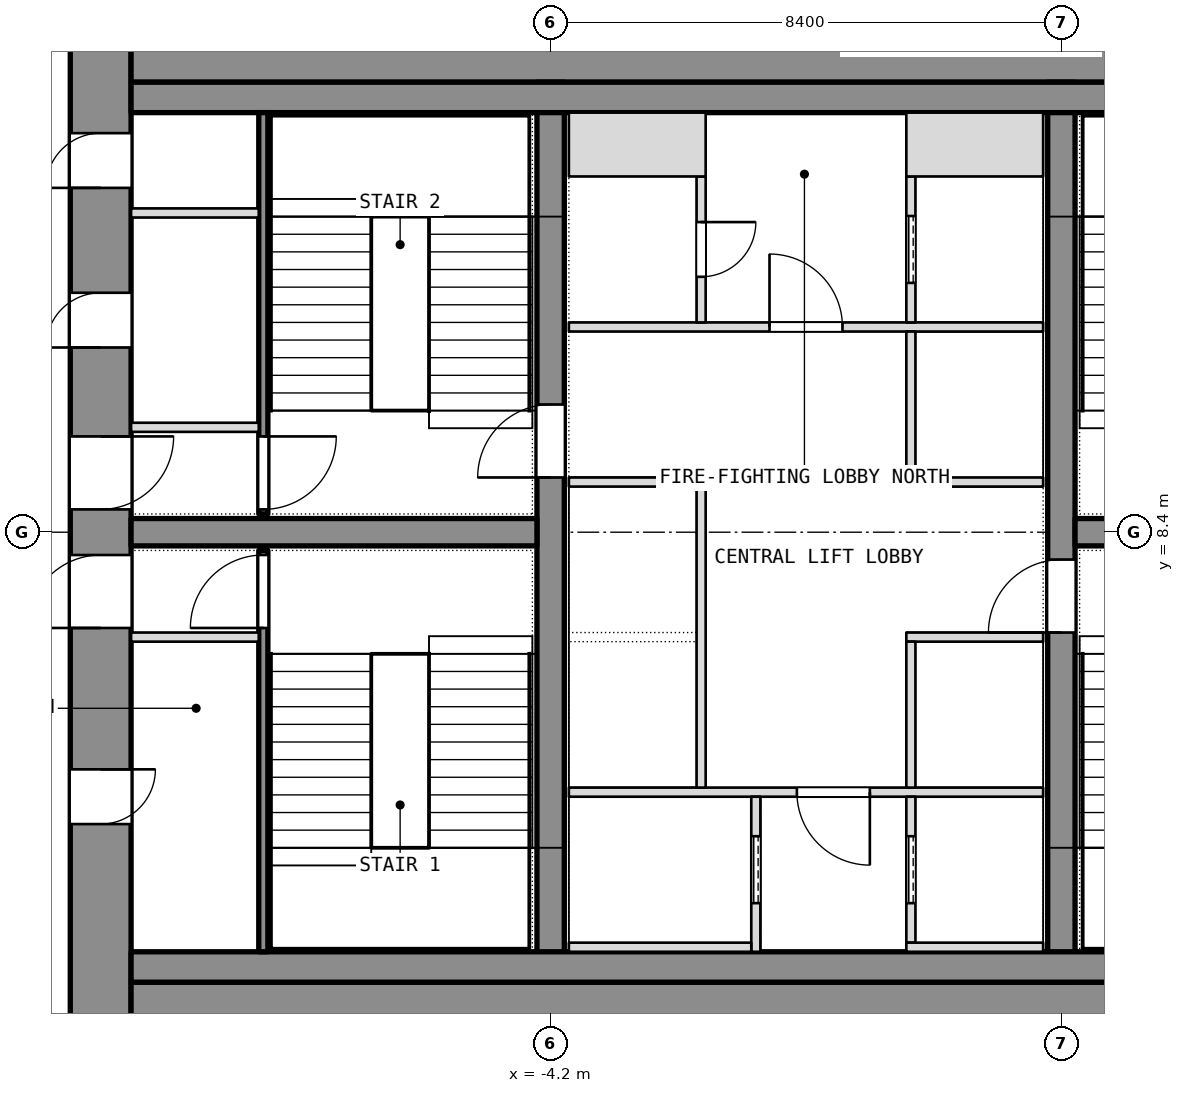
"""IFC4 building model, lengths in metres.
Left out: names, types, materials, properties, quantities, classifications, styles, units other than length and angle.
Written with IfcOpenShell. Run it as: python <this file> out.ifc"""

import sys

from ifc_helpers import new_model, si_unit, direction, frame, frame_2d, origin, place, context, subcontext, project, spatial, rectangle, extrude, element, fill, save


model = new_model("IFC4")
c1 = context("Model", 3, precision=1e-05, world=origin(), true_north=direction((0.0, 1.0)))
c2 = subcontext(c1, "Body", "Model", "MODEL_VIEW")
j1 = project(units=[si_unit("LENGTHUNIT", "METRE"), si_unit("PLANEANGLEUNIT", "RADIAN")], contexts=[c1])
p1 = place(None, origin())
s1 = spatial("IfcSite", under=j1, at=p1, CompositionType="ELEMENT")
p2 = place(p1, origin())
s2 = spatial("IfcBuilding", under=s1, at=p2, CompositionType="ELEMENT")
p3 = place(p2, frame((0.0, 0.0, 104.9)))
s3 = spatial("IfcBuildingStorey", under=s2, at=p3, CompositionType="ELEMENT", Elevation=104.9)
p4 = place(p3, frame((-11.6, 0.0, 0.0), z_axis=(0.0, 0.0, 1.0), x_axis=(0.0, 1.0, 0.0)))
e1 = element("IfcWall", 1, at=p4, inside=s3, PredefinedType="SHEAR", context=c2, shape_type="SweptSolid", body=[
    extrude(rectangle(XDim=16.8, YDim=1.0, at=frame_2d((8.4, 0.0))), origin(), (0.0, 0.0, 1.0), 3.6),
])
p5 = place(p4, frame((3.6, 0.0, 0.0)))
e2 = element("IfcOpeningElement", 2, at=p5, cuts=e1, PredefinedType="OPENING", context=c2, shape_type="SweptSolid", body=[
    extrude(rectangle(XDim=0.9, YDim=2.1, at=frame_2d((0.45, 1.05))), frame((0.0, 0.5, 0.0), z_axis=(0.0, -1.0, 0.0), x_axis=(1.0, 0.0, 0.0)), (0.0, 0.0, 1.0), 1.0),
])
p6 = place(p4, frame((6.825, 0.0, 0.0)))
e3 = element("IfcOpeningElement", 3, at=p6, cuts=e1, PredefinedType="OPENING", context=c2, shape_type="SweptSolid", body=[
    extrude(rectangle(XDim=1.2, YDim=2.1, at=frame_2d((0.6, 1.05))), frame((0.0, 0.5, 0.0), z_axis=(0.0, -1.0, 0.0), x_axis=(1.0, 0.0, 0.0)), (0.0, 0.0, 1.0), 1.0),
])
p7 = place(p4, frame((14.062, 0.0, 0.0)))
e4 = element("IfcOpeningElement", 4, at=p7, cuts=e1, PredefinedType="OPENING", context=c2, shape_type="SweptSolid", body=[
    extrude(rectangle(XDim=0.9, YDim=2.1, at=frame_2d((0.45, 1.05))), frame((0.0, 0.5, 0.0), z_axis=(0.0, -1.0, 0.0), x_axis=(1.0, 0.0, 0.0)), (0.0, 0.0, 1.0), 1.0),
])
p8 = place(p4, frame((11.438, 0.0, 0.0)))
e5 = element("IfcOpeningElement", 5, at=p8, cuts=e1, PredefinedType="OPENING", context=c2, shape_type="SweptSolid", body=[
    extrude(rectangle(XDim=0.9, YDim=2.1, at=frame_2d((0.45, 1.05))), frame((0.0, 0.5, 0.0), z_axis=(0.0, -1.0, 0.0), x_axis=(1.0, 0.0, 0.0)), (0.0, 0.0, 1.0), 1.0),
])
p9 = place(p4, frame((8.775, 0.0, 0.0)))
e6 = element("IfcOpeningElement", 6, at=p9, cuts=e1, PredefinedType="OPENING", context=c2, shape_type="SweptSolid", body=[
    extrude(rectangle(XDim=1.2, YDim=2.1, at=frame_2d((0.6, 1.05))), frame((0.0, 0.5, 0.0), z_axis=(0.0, -1.0, 0.0), x_axis=(1.0, 0.0, 0.0)), (0.0, 0.0, 1.0), 1.0),
])
for number, where, z_axis, x_axis in (
    (7, (-11.1, 0.5, 0.0), (0.0, 0.0, 1.0), (1.0, 0.0, 0.0)),
    (8, (-11.1, 16.3, 0.0), (0.0, 0.0, 1.0), (1.0, 0.0, 0.0)),
):
    element("IfcWall", number, at=place(p3, frame(where, z_axis=z_axis, x_axis=x_axis)), inside=s3, PredefinedType="SHEAR", context=c2, shape_type="SweptSolid", body=[
        extrude(rectangle(XDim=22.2, YDim=1.0, at=frame_2d((11.1, 0.0))), origin(), (0.0, 0.0, 1.0), 3.6),
    ])
p10 = place(p3, frame((-4.2, 1.0, 0.0), z_axis=(0.0, 0.0, 1.0), x_axis=(0.0, 1.0, 0.0)))
e9 = element("IfcWall", 9, at=p10, inside=s3, PredefinedType="SHEAR", context=c2, shape_type="SweptSolid", body=[
    extrude(rectangle(XDim=14.8, YDim=0.45, at=frame_2d((7.4, 0.0))), origin(), (0.0, 0.0, 1.0), 3.6),
])
p11 = place(p10, frame((8.3, 0.0, 0.0)))
e10 = element("IfcOpeningElement", 10, at=p11, cuts=e9, PredefinedType="OPENING", context=c2, shape_type="SweptSolid", body=[
    extrude(rectangle(XDim=1.2, YDim=2.1, at=frame_2d((0.6, 1.05))), frame((0.0, 0.225, 0.0), z_axis=(0.0, -1.0, 0.0), x_axis=(1.0, 0.0, 0.0)), (0.0, 0.0, 1.0), 0.45),
])
p12 = place(p3, frame((4.2, 1.0, 0.0), z_axis=(0.0, 0.0, 1.0), x_axis=(0.0, 1.0, 0.0)))
e11 = element("IfcWall", 11, at=p12, inside=s3, PredefinedType="SHEAR", context=c2, shape_type="SweptSolid", body=[
    extrude(rectangle(XDim=14.8, YDim=0.45, at=frame_2d((7.4, 0.0))), origin(), (0.0, 0.0, 1.0), 3.6),
])
p13 = place(p12, frame((5.75, 0.0, 0.0)))
e12 = element("IfcOpeningElement", 12, at=p13, cuts=e11, PredefinedType="OPENING", context=c2, shape_type="SweptSolid", body=[
    extrude(rectangle(XDim=1.2, YDim=2.1, at=frame_2d((0.6, 1.05))), frame((0.0, 0.225, 0.0), z_axis=(0.0, -1.0, 0.0), x_axis=(1.0, 0.0, 0.0)), (0.0, 0.0, 1.0), 0.45),
])
for number, where, z_axis, x_axis in (
    (13, (-11.1, 8.4, 0.0), (0.0, 0.0, 1.0), (1.0, 0.0, 0.0)),
    (14, (4.425, 8.4, 0.0), (0.0, 0.0, 1.0), (1.0, 0.0, 0.0)),
):
    element("IfcWall", number, at=place(p3, frame(where, z_axis=z_axis, x_axis=x_axis)), inside=s3, PredefinedType="SHEAR", context=c2, shape_type="SweptSolid", body=[
        extrude(rectangle(XDim=6.675, YDim=0.45, at=frame_2d((3.337, 0.0))), origin(), (0.0, 0.0, 1.0), 3.6),
    ])
for number, where, z_axis, x_axis in (
    (15, (-11.1, 1.25, 0.0), (0.0, 0.0, 1.0), (1.0, 0.0, 0.0)),
    (16, (-11.1, 15.55, 0.0), (0.0, 0.0, 1.0), (1.0, 0.0, 0.0)),
):
    element("IfcWall", number, at=place(p3, frame(where, z_axis=z_axis, x_axis=x_axis)), inside=s3, PredefinedType="PARTITIONING", context=c2, shape_type="SweptSolid", body=[
        extrude(rectangle(XDim=22.2, YDim=0.5, at=frame_2d((11.1, 0.0))), origin(), (0.0, 0.0, 1.0), 3.34),
    ])
p14 = place(p3, frame((-8.925, 1.5, 0.0), z_axis=(0.0, 0.0, 1.0), x_axis=(0.0, 1.0, 0.0)))
e17 = element("IfcWall", 17, at=p14, inside=s3, PredefinedType="SHEAR", context=c2, shape_type="SweptSolid", body=[
    extrude(rectangle(XDim=6.6, YDim=0.15, at=frame_2d((3.3, 0.0))), origin(), (0.0, 0.0, 1.0), 3.34),
])
p15 = place(p14, frame((5.325, 0.0, 0.0)))
e18 = element("IfcOpeningElement", 18, at=p15, cuts=e17, PredefinedType="OPENING", context=c2, shape_type="SweptSolid", body=[
    extrude(rectangle(XDim=1.2, YDim=2.1, at=frame_2d((0.6, 1.05))), frame((0.0, 0.075, 0.0), z_axis=(0.0, -1.0, 0.0), x_axis=(1.0, 0.0, 0.0)), (0.0, 0.0, 1.0), 0.15),
])
p16 = place(p3, frame((-11.1, 6.675, 0.0), z_axis=(0.0, 0.0, 1.0), x_axis=(1.0, 0.0, 0.0)))
e19 = element("IfcWall", 19, at=p16, inside=s3, PredefinedType="PARTITIONING", context=c2, shape_type="SweptSolid", body=[
    extrude(rectangle(XDim=2.1, YDim=0.15, at=frame_2d((1.05, 0.0))), origin(), (0.0, 0.0, 1.0), 3.34),
])
p17 = place(p3, frame((-8.925, 8.7, 0.0), z_axis=(0.0, 0.0, 1.0), x_axis=(0.0, 1.0, 0.0)))
e20 = element("IfcWall", 20, at=p17, inside=s3, PredefinedType="SHEAR", context=c2, shape_type="SweptSolid", body=[
    extrude(rectangle(XDim=6.6, YDim=0.15, at=frame_2d((3.3, 0.0))), origin(), (0.0, 0.0, 1.0), 3.34),
])
p18 = place(p17, frame((0.075, 0.0, 0.0)))
e21 = element("IfcOpeningElement", 21, at=p18, cuts=e20, PredefinedType="OPENING", context=c2, shape_type="SweptSolid", body=[
    extrude(rectangle(XDim=1.2, YDim=2.1, at=frame_2d((0.6, 1.05))), frame((0.0, 0.075, 0.0), z_axis=(0.0, -1.0, 0.0), x_axis=(1.0, 0.0, 0.0)), (0.0, 0.0, 1.0), 0.15),
])
for number, where, z_axis, x_axis in (
    (22, (-11.1, 10.125, 0.0), (0.0, 0.0, 1.0), (1.0, 0.0, 0.0)),
    (23, (-11.1, 13.65, 0.0), (0.0, 0.0, 1.0), (1.0, 0.0, 0.0)),
):
    element("IfcWall", number, at=place(p3, frame(where, z_axis=z_axis, x_axis=x_axis)), inside=s3, PredefinedType="PARTITIONING", context=c2, shape_type="SweptSolid", body=[
        extrude(rectangle(XDim=2.1, YDim=0.15, at=frame_2d((1.05, 0.0))), origin(), (0.0, 0.0, 1.0), 3.34),
    ])
p19 = place(p3, frame((-3.9, 4.125, 0.0), z_axis=(0.0, 0.0, 1.0), x_axis=(1.0, 0.0, 0.0)))
e24 = element("IfcWall", 24, at=p19, inside=s3, PredefinedType="PARTITIONING", context=c2, shape_type="SweptSolid", body=[
    extrude(rectangle(XDim=7.8, YDim=0.15, at=frame_2d((3.9, 0.0))), origin(), (0.0, 0.0, 1.0), 3.34),
])
p20 = place(p19, frame((3.75, 0.0, 0.0)))
e25 = element("IfcOpeningElement", 25, at=p20, cuts=e24, PredefinedType="OPENING", context=c2, shape_type="SweptSolid", body=[
    extrude(rectangle(XDim=1.2, YDim=2.1, at=frame_2d((0.6, 1.05))), frame((0.0, 0.075, 0.0), z_axis=(0.0, -1.0, 0.0), x_axis=(1.0, 0.0, 0.0)), (0.0, 0.0, 1.0), 0.15),
])
p21 = place(p3, frame((-3.9, 11.775, 0.0), z_axis=(0.0, 0.0, 1.0), x_axis=(1.0, 0.0, 0.0)))
e26 = element("IfcWall", 26, at=p21, inside=s3, PredefinedType="PARTITIONING", context=c2, shape_type="SweptSolid", body=[
    extrude(rectangle(XDim=7.8, YDim=0.15, at=frame_2d((3.9, 0.0))), origin(), (0.0, 0.0, 1.0), 3.34),
])
p22 = place(p21, frame((3.3, 0.0, 0.0)))
e27 = element("IfcOpeningElement", 27, at=p22, cuts=e26, PredefinedType="OPENING", context=c2, shape_type="SweptSolid", body=[
    extrude(rectangle(XDim=1.2, YDim=2.1, at=frame_2d((0.6, 1.05))), frame((0.0, 0.075, 0.0), z_axis=(0.0, -1.0, 0.0), x_axis=(1.0, 0.0, 0.0)), (0.0, 0.0, 1.0), 0.15),
])
p23 = place(p3, frame((-0.825, 1.5, 0.0), z_axis=(0.0, 0.0, 1.0), x_axis=(0.0, 1.0, 0.0)))
e28 = element("IfcWall", 28, at=p23, inside=s3, PredefinedType="SHEAR", context=c2, shape_type="SweptSolid", body=[
    extrude(rectangle(XDim=2.55, YDim=0.15, at=frame_2d((1.275, 0.0))), origin(), (0.0, 0.0, 1.0), 3.6),
])
p24 = place(p23, frame((0.8, 0.0, 0.0)))
e29 = element("IfcOpeningElement", 29, at=p24, cuts=e28, PredefinedType="OPENING", context=c2, shape_type="SweptSolid", body=[
    extrude(rectangle(XDim=1.1, YDim=2.1, at=frame_2d((0.55, 1.05))), frame((0.0, 0.075, 0.0), z_axis=(0.0, -1.0, 0.0), x_axis=(1.0, 0.0, 0.0)), (0.0, 0.0, 1.0), 0.15),
])
p25 = place(p3, frame((-3.9, 1.575, 0.0), z_axis=(0.0, 0.0, 1.0), x_axis=(1.0, 0.0, 0.0)))
e30 = element("IfcWall", 30, at=p25, inside=s3, PredefinedType="SHEAR", context=c2, shape_type="SweptSolid", body=[
    extrude(rectangle(XDim=3.0, YDim=0.15, at=frame_2d((1.5, 0.0))), origin(), (0.0, 0.0, 1.0), 3.6),
])
p26 = place(p3, frame((-1.725, 4.2, 0.0), z_axis=(0.0, 0.0, 1.0), x_axis=(0.0, 1.0, 0.0)))
e31 = element("IfcWall", 31, at=p26, inside=s3, PredefinedType="SHEAR", context=c2, shape_type="SweptSolid", body=[
    extrude(rectangle(XDim=4.95, YDim=0.15, at=frame_2d((2.475, 0.0))), origin(), (0.0, 0.0, 1.0), 3.6),
])
p27 = place(p3, frame((-3.9, 9.225, 0.0), z_axis=(0.0, 0.0, 1.0), x_axis=(1.0, 0.0, 0.0)))
e32 = element("IfcWall", 32, at=p27, inside=s3, PredefinedType="SHEAR", context=c2, shape_type="SweptSolid", body=[
    extrude(rectangle(XDim=2.25, YDim=0.15, at=frame_2d((1.125, 0.0))), origin(), (0.0, 0.0, 1.0), 3.6),
])
p28 = place(p3, frame((-1.725, 11.85, 0.0), z_axis=(0.0, 0.0, 1.0), x_axis=(0.0, 1.0, 0.0)))
e33 = element("IfcWall", 33, at=p28, inside=s3, PredefinedType="PARTITIONING", context=c2, shape_type="SweptSolid", body=[
    extrude(rectangle(XDim=2.4, YDim=0.15, at=frame_2d((1.2, 0.0))), origin(), (0.0, 0.0, 1.0), 3.34),
])
p29 = place(p28, frame((0.75, 0.0, 0.0)))
e34 = element("IfcOpeningElement", 34, at=p29, cuts=e33, PredefinedType="OPENING", context=c2, shape_type="SweptSolid", body=[
    extrude(rectangle(XDim=0.9, YDim=2.1, at=frame_2d((0.45, 1.05))), frame((0.0, 0.075, 0.0), z_axis=(0.0, -1.0, 0.0), x_axis=(1.0, 0.0, 0.0)), (0.0, 0.0, 1.0), 0.15),
])
p30 = place(p3, frame((-3.9, 14.775, 0.0), z_axis=(0.0, 0.0, 1.0), x_axis=(1.0, 0.0, 0.0)))
e35 = element("IfcWall", 35, at=p30, inside=s3, PredefinedType="PARTITIONING", context=c2, shape_type="SweptSolid", body=[
    extrude(rectangle(XDim=2.25, YDim=1.05, at=frame_2d((1.125, 0.0))), origin(), (0.0, 0.0, 1.0), 3.34),
])
p31 = place(p3, frame((1.725, 1.65, 0.0), z_axis=(0.0, 0.0, 1.0), x_axis=(0.0, 1.0, 0.0)))
e36 = element("IfcWall", 36, at=p31, inside=s3, PredefinedType="SHEAR", context=c2, shape_type="SweptSolid", body=[
    extrude(rectangle(XDim=2.4, YDim=0.15, at=frame_2d((1.2, 0.0))), origin(), (0.0, 0.0, 1.0), 3.6),
])
p32 = place(p31, frame((0.65, 0.0, 0.0)))
e37 = element("IfcOpeningElement", 37, at=p32, cuts=e36, PredefinedType="OPENING", context=c2, shape_type="SweptSolid", body=[
    extrude(rectangle(XDim=1.1, YDim=2.1, at=frame_2d((0.55, 1.05))), frame((0.0, 0.075, 0.0), z_axis=(0.0, -1.0, 0.0), x_axis=(1.0, 0.0, 0.0)), (0.0, 0.0, 1.0), 0.15),
])
p33 = place(p3, frame((1.65, 1.575, 0.0), z_axis=(0.0, 0.0, 1.0), x_axis=(1.0, 0.0, 0.0)))
e38 = element("IfcWall", 38, at=p33, inside=s3, PredefinedType="SHEAR", context=c2, shape_type="SweptSolid", body=[
    extrude(rectangle(XDim=2.25, YDim=0.15, at=frame_2d((1.125, 0.0))), origin(), (0.0, 0.0, 1.0), 3.6),
])
p34 = place(p3, frame((1.725, 11.85, 0.0), z_axis=(0.0, 0.0, 1.0), x_axis=(0.0, 1.0, 0.0)))
e39 = element("IfcWall", 39, at=p34, inside=s3, PredefinedType="SHEAR", context=c2, shape_type="SweptSolid", body=[
    extrude(rectangle(XDim=2.4, YDim=0.15, at=frame_2d((1.2, 0.0))), origin(), (0.0, 0.0, 1.0), 3.6),
])
p35 = place(p34, frame((0.65, 0.0, 0.0)))
e40 = element("IfcOpeningElement", 40, at=p35, cuts=e39, PredefinedType="OPENING", context=c2, shape_type="SweptSolid", body=[
    extrude(rectangle(XDim=1.1, YDim=2.1, at=frame_2d((0.55, 1.05))), frame((0.0, 0.075, 0.0), z_axis=(0.0, -1.0, 0.0), x_axis=(1.0, 0.0, 0.0)), (0.0, 0.0, 1.0), 0.15),
])
p36 = place(p3, frame((1.65, 14.775, 0.0), z_axis=(0.0, 0.0, 1.0), x_axis=(1.0, 0.0, 0.0)))
e41 = element("IfcWall", 41, at=p36, inside=s3, PredefinedType="SHEAR", context=c2, shape_type="SweptSolid", body=[
    extrude(rectangle(XDim=2.25, YDim=1.05, at=frame_2d((1.125, 0.0))), origin(), (0.0, 0.0, 1.0), 3.6),
])
for number, where, z_axis, x_axis in (
    (42, (1.65, 6.675, 0.0), (0.0, 0.0, 1.0), (1.0, 0.0, 0.0)),
    (43, (1.65, 9.225, 0.0), (0.0, 0.0, 1.0), (1.0, 0.0, 0.0)),
):
    element("IfcWall", number, at=place(p3, frame(where, z_axis=z_axis, x_axis=x_axis)), inside=s3, PredefinedType="SHEAR", context=c2, shape_type="SweptSolid", body=[
        extrude(rectangle(XDim=2.25, YDim=0.15, at=frame_2d((1.125, 0.0))), origin(), (0.0, 0.0, 1.0), 3.6),
    ])
p37 = place(p3, frame((1.725, 4.2, 0.0), z_axis=(0.0, 0.0, 1.0), x_axis=(0.0, 1.0, 0.0)))
e44 = element("IfcWall", 44, at=p37, inside=s3, PredefinedType="SHEAR", context=c2, shape_type="SweptSolid", body=[
    extrude(rectangle(XDim=2.4, YDim=0.15, at=frame_2d((1.2, 0.0))), origin(), (0.0, 0.0, 1.0), 3.6),
])
p38 = place(p3, frame((1.725, 9.3, 0.0), z_axis=(0.0, 0.0, 1.0), x_axis=(0.0, 1.0, 0.0)))
e45 = element("IfcWall", 45, at=p38, inside=s3, PredefinedType="SHEAR", context=c2, shape_type="SweptSolid", body=[
    extrude(rectangle(XDim=2.4, YDim=0.15, at=frame_2d((1.2, 0.0))), origin(), (0.0, 0.0, 1.0), 3.6),
])
p39 = place(p5, origin())
e46 = element("IfcDoor", 46, at=p39, inside=s3, OperationType="SINGLE_SWING_LEFT", PredefinedType="DOOR", context=c2, shape_type="SweptSolid", body=[
    extrude(rectangle(XDim=0.9, YDim=2.1, at=frame_2d((0.45, 1.05))), frame((0.0, 0.025, 0.0), z_axis=(0.0, -1.0, 0.0), x_axis=(1.0, 0.0, 0.0)), (0.0, 0.0, 1.0), 0.05),
])
fill(e2, e46)
p40 = place(p6, origin())
e47 = element("IfcDoor", 47, at=p40, inside=s3, OperationType="SINGLE_SWING_LEFT", PredefinedType="DOOR", context=c2, shape_type="SweptSolid", body=[
    extrude(rectangle(XDim=1.2, YDim=2.1, at=frame_2d((0.6, 1.05))), frame((0.0, 0.025, 0.0), z_axis=(0.0, -1.0, 0.0), x_axis=(1.0, 0.0, 0.0)), (0.0, 0.0, 1.0), 0.05),
])
fill(e3, e47)
p41 = place(p15, origin())
e48 = element("IfcDoor", 48, at=p41, inside=s3, OperationType="SINGLE_SWING_LEFT", PredefinedType="DOOR", context=c2, shape_type="SweptSolid", body=[
    extrude(rectangle(XDim=1.2, YDim=2.1, at=frame_2d((0.6, 1.05))), frame((0.0, 0.025, 0.0), z_axis=(0.0, -1.0, 0.0), x_axis=(1.0, 0.0, 0.0)), (0.0, 0.0, 1.0), 0.05),
])
fill(e18, e48)
p42 = place(p7, origin())
e49 = element("IfcDoor", 49, at=p42, inside=s3, OperationType="SINGLE_SWING_LEFT", PredefinedType="DOOR", context=c2, shape_type="SweptSolid", body=[
    extrude(rectangle(XDim=0.9, YDim=2.1, at=frame_2d((0.45, 1.05))), frame((0.0, 0.025, 0.0), z_axis=(0.0, -1.0, 0.0), x_axis=(1.0, 0.0, 0.0)), (0.0, 0.0, 1.0), 0.05),
])
fill(e4, e49)
p43 = place(p8, origin())
e50 = element("IfcDoor", 50, at=p43, inside=s3, OperationType="SINGLE_SWING_LEFT", PredefinedType="DOOR", context=c2, shape_type="SweptSolid", body=[
    extrude(rectangle(XDim=0.9, YDim=2.1, at=frame_2d((0.45, 1.05))), frame((0.0, 0.025, 0.0), z_axis=(0.0, -1.0, 0.0), x_axis=(1.0, 0.0, 0.0)), (0.0, 0.0, 1.0), 0.05),
])
fill(e5, e50)
p44 = place(p9, origin())
e51 = element("IfcDoor", 51, at=p44, inside=s3, OperationType="SINGLE_SWING_LEFT", PredefinedType="DOOR", context=c2, shape_type="SweptSolid", body=[
    extrude(rectangle(XDim=1.2, YDim=2.1, at=frame_2d((0.6, 1.05))), frame((0.0, 0.025, 0.0), z_axis=(0.0, -1.0, 0.0), x_axis=(1.0, 0.0, 0.0)), (0.0, 0.0, 1.0), 0.05),
])
fill(e6, e51)
p45 = place(p18, origin())
e52 = element("IfcDoor", 52, at=p45, inside=s3, OperationType="SINGLE_SWING_LEFT", PredefinedType="DOOR", context=c2, shape_type="SweptSolid", body=[
    extrude(rectangle(XDim=1.2, YDim=2.1, at=frame_2d((0.6, 1.05))), frame((0.0, 0.025, 0.0), z_axis=(0.0, -1.0, 0.0), x_axis=(1.0, 0.0, 0.0)), (0.0, 0.0, 1.0), 0.05),
])
fill(e21, e52)
p46 = place(p24, origin())
e53 = element("IfcDoor", 53, at=p46, inside=s3, OperationType="SLIDING_TO_LEFT", PredefinedType="DOOR", context=c2, shape_type="SweptSolid", body=[
    extrude(rectangle(XDim=1.1, YDim=2.1, at=frame_2d((0.55, 1.05))), frame((0.0, 0.025, 0.0), z_axis=(0.0, -1.0, 0.0), x_axis=(1.0, 0.0, 0.0)), (0.0, 0.0, 1.0), 0.05),
])
fill(e29, e53)
p47 = place(p32, origin())
e54 = element("IfcDoor", 54, at=p47, inside=s3, OperationType="SLIDING_TO_LEFT", PredefinedType="DOOR", context=c2, shape_type="SweptSolid", body=[
    extrude(rectangle(XDim=1.1, YDim=2.1, at=frame_2d((0.55, 1.05))), frame((0.0, 0.025, 0.0), z_axis=(0.0, -1.0, 0.0), x_axis=(1.0, 0.0, 0.0)), (0.0, 0.0, 1.0), 0.05),
])
fill(e37, e54)
p48 = place(p35, origin())
e55 = element("IfcDoor", 55, at=p48, inside=s3, OperationType="SLIDING_TO_LEFT", PredefinedType="DOOR", context=c2, shape_type="SweptSolid", body=[
    extrude(rectangle(XDim=1.1, YDim=2.1, at=frame_2d((0.55, 1.05))), frame((0.0, 0.025, 0.0), z_axis=(0.0, -1.0, 0.0), x_axis=(1.0, 0.0, 0.0)), (0.0, 0.0, 1.0), 0.05),
])
fill(e40, e55)
p49 = place(p20, origin())
e56 = element("IfcDoor", 56, at=p49, inside=s3, OperationType="SINGLE_SWING_LEFT", PredefinedType="DOOR", context=c2, shape_type="SweptSolid", body=[
    extrude(rectangle(XDim=1.2, YDim=2.1, at=frame_2d((0.6, 1.05))), frame((0.0, 0.025, 0.0), z_axis=(0.0, -1.0, 0.0), x_axis=(1.0, 0.0, 0.0)), (0.0, 0.0, 1.0), 0.05),
])
fill(e25, e56)
p50 = place(p22, origin())
e57 = element("IfcDoor", 57, at=p50, inside=s3, OperationType="SINGLE_SWING_LEFT", PredefinedType="DOOR", context=c2, shape_type="SweptSolid", body=[
    extrude(rectangle(XDim=1.2, YDim=2.1, at=frame_2d((0.6, 1.05))), frame((0.0, 0.025, 0.0), z_axis=(0.0, -1.0, 0.0), x_axis=(1.0, 0.0, 0.0)), (0.0, 0.0, 1.0), 0.05),
])
fill(e27, e57)
p51 = place(p29, origin())
e58 = element("IfcDoor", 58, at=p51, inside=s3, OperationType="SINGLE_SWING_LEFT", PredefinedType="DOOR", context=c2, shape_type="SweptSolid", body=[
    extrude(rectangle(XDim=0.9, YDim=2.1, at=frame_2d((0.45, 1.05))), frame((0.0, 0.025, 0.0), z_axis=(0.0, -1.0, 0.0), x_axis=(1.0, 0.0, 0.0)), (0.0, 0.0, 1.0), 0.05),
])
fill(e34, e58)
p52 = place(p11, origin())
e59 = element("IfcDoor", 59, at=p52, inside=s3, OperationType="SINGLE_SWING_LEFT", PredefinedType="DOOR", context=c2, shape_type="SweptSolid", body=[
    extrude(rectangle(XDim=1.2, YDim=2.1, at=frame_2d((0.6, 1.05))), frame((0.0, 0.025, 0.0), z_axis=(0.0, -1.0, 0.0), x_axis=(1.0, 0.0, 0.0)), (0.0, 0.0, 1.0), 0.05),
])
fill(e10, e59)
p53 = place(p13, origin())
e60 = element("IfcDoor", 60, at=p53, inside=s3, OperationType="SINGLE_SWING_LEFT", PredefinedType="DOOR", context=c2, shape_type="SweptSolid", body=[
    extrude(rectangle(XDim=1.2, YDim=2.1, at=frame_2d((0.6, 1.05))), frame((0.0, 0.025, 0.0), z_axis=(0.0, -1.0, 0.0), x_axis=(1.0, 0.0, 0.0)), (0.0, 0.0, 1.0), 0.05),
])
fill(e12, e60)
save(model, sys.argv[1])
